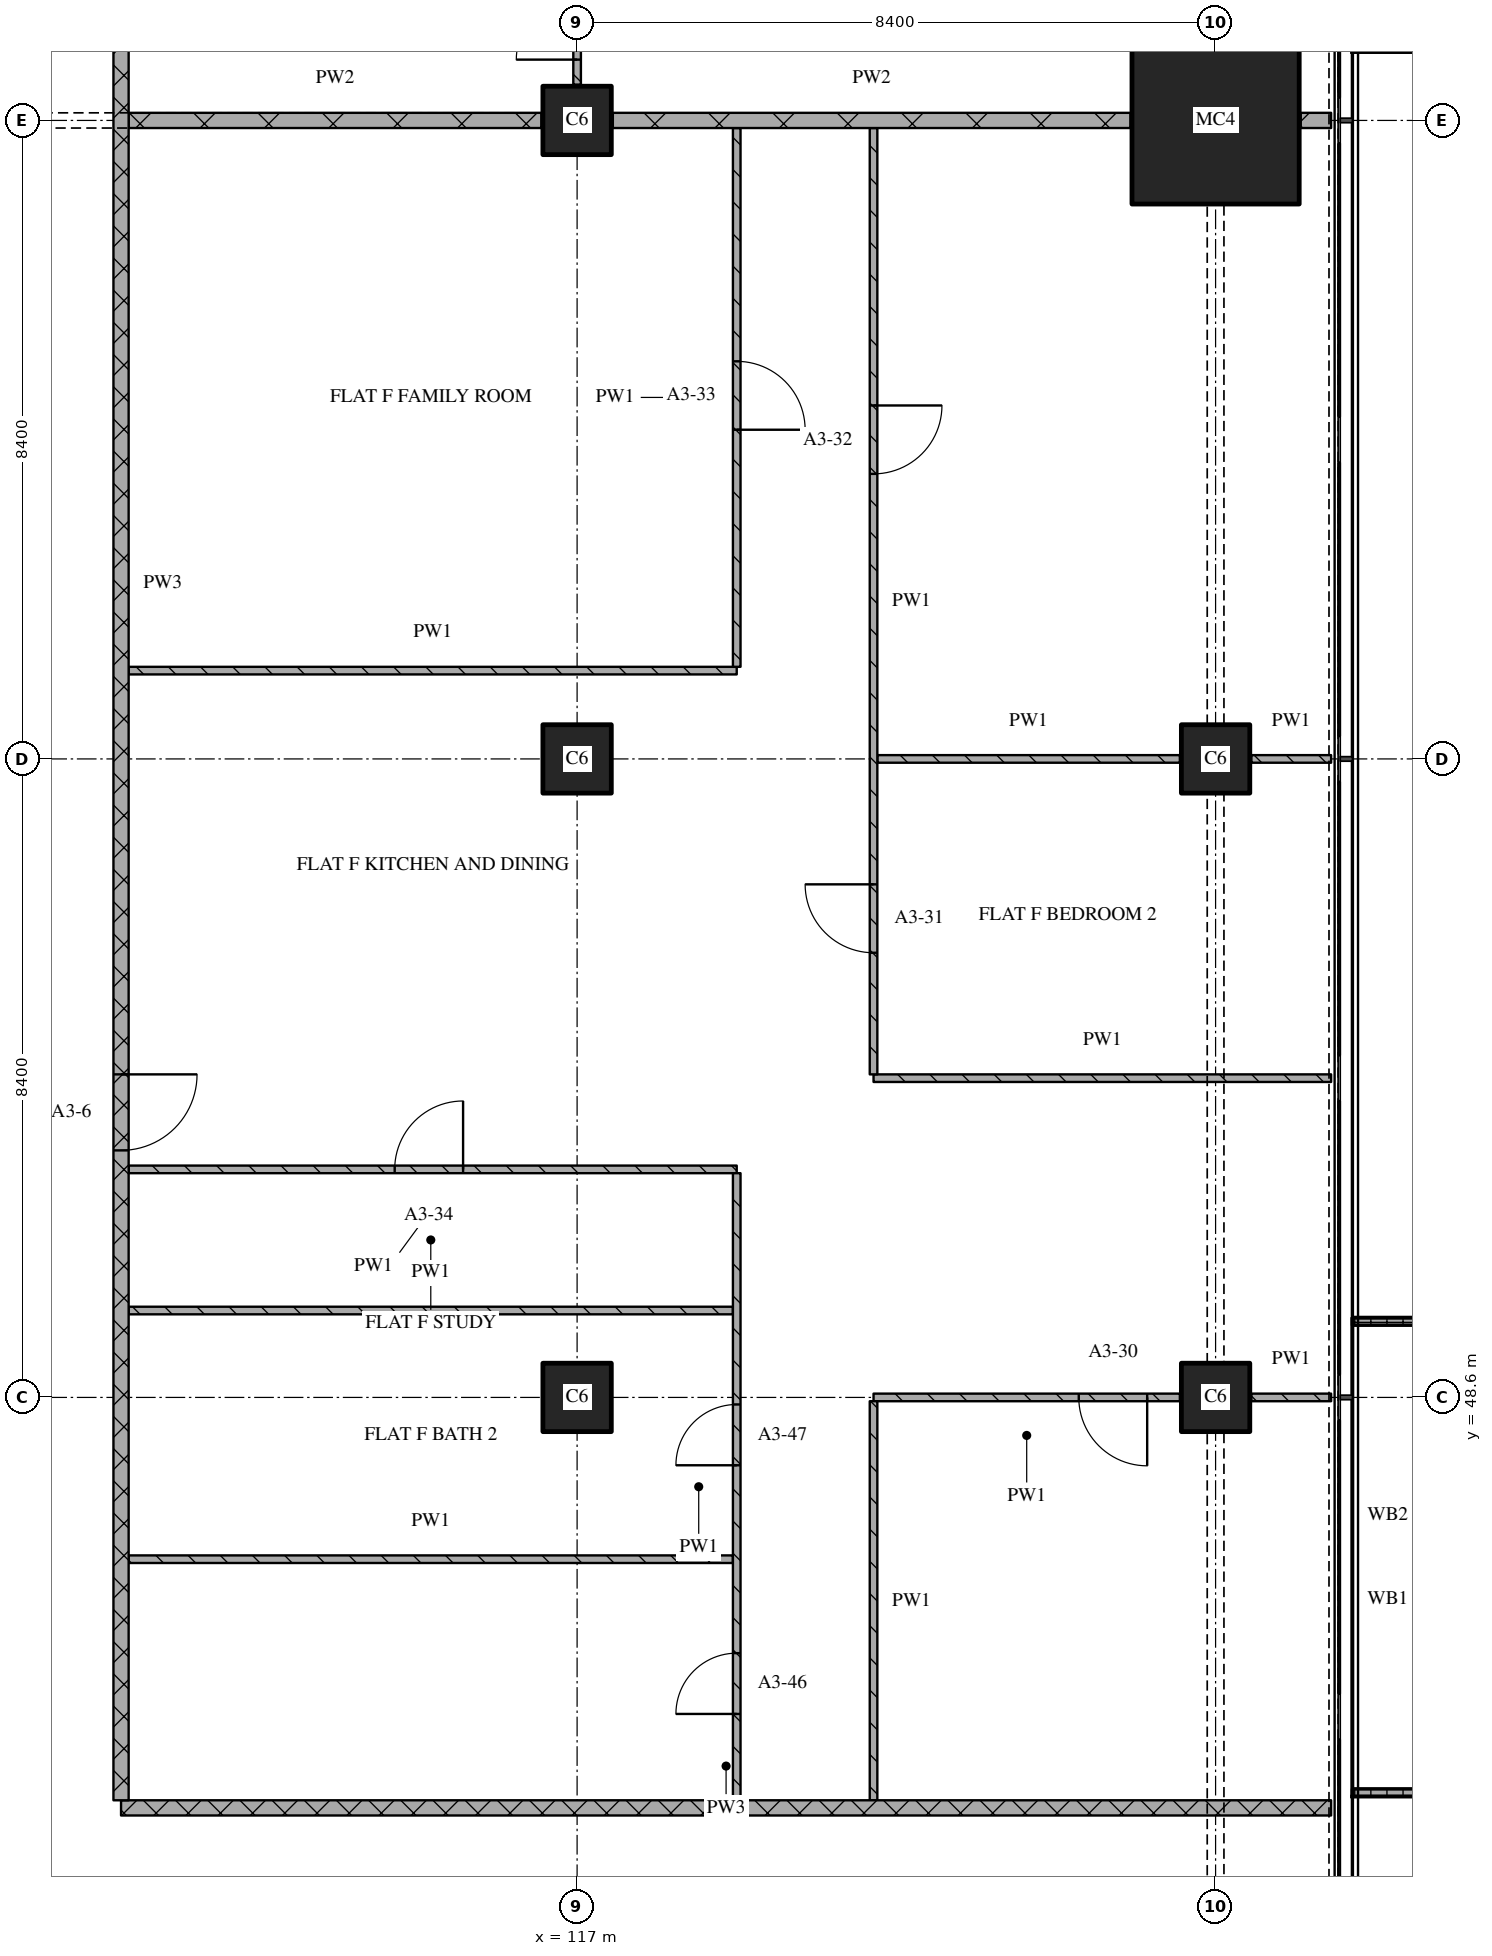
"""IFC4 building model, lengths in metres.
Left out: names, types, materials, properties, quantities, classifications, styles, units other than length and angle.
Written with IfcOpenShell. Run it as: python <this file> out.ifc"""

import sys

from ifc_helpers import new_model, si_unit, direction, frame, frame_2d, origin, origin_2d, place, context, subcontext, project, spatial, polyline, rectangle, outline, extrude, element, fill, save


model = new_model("IFC4")
c1 = context("Model", 3, precision=1e-05, world=origin(), true_north=direction((0.0, 1.0)))
c2 = subcontext(c1, "Body", "Model", "MODEL_VIEW")
j1 = project(units=[si_unit("LENGTHUNIT", "METRE"), si_unit("PLANEANGLEUNIT", "RADIAN")], contexts=[c1])
p1 = place(None, origin())
s1 = spatial("IfcSite", under=j1, at=p1, CompositionType="ELEMENT")
p2 = place(p1, origin())
s2 = spatial("IfcBuilding", under=s1, at=p2, CompositionType="ELEMENT")
p3 = place(p2, frame((0.0, 0.0, 62.4)))
s3 = spatial("IfcBuildingStorey", under=s2, at=p3, CompositionType="ELEMENT", Elevation=62.4)
for number, where, z_axis, x_axis in (
    (1, (117.0, 48.6, 0.0), (0.0, 0.0, 1.0), (1.0, 0.0, 0.0)),
    (2, (117.0, 57.0, 0.0), (0.0, 0.0, 1.0), (1.0, 0.0, 0.0)),
    (3, (117.0, 65.4, 0.0), (0.0, 0.0, 1.0), (1.0, 0.0, 0.0)),
    (4, (125.4, 48.6, 0.0), (0.0, 0.0, 1.0), (1.0, 0.0, 0.0)),
    (5, (125.4, 57.0, 0.0), (0.0, 0.0, 1.0), (1.0, 0.0, 0.0)),
):
    element("IfcColumn", number, at=place(p3, frame(where, z_axis=z_axis, x_axis=x_axis)), inside=s3, PredefinedType="COLUMN", context=c2, shape_type="SweptSolid", body=[
        extrude(rectangle(XDim=0.9, YDim=0.9, at=origin_2d()), origin(), (0.0, 0.0, 1.0), 3.6),
    ])
p4 = place(p3, frame((125.4, 65.4, 0.0), z_axis=(0.0, 0.0, 1.0), x_axis=(1.0, 0.0, 0.0)))
e6 = element("IfcColumn", 6, at=p4, inside=s3, PredefinedType="COLUMN", context=c2, shape_type="SweptSolid", body=[
    extrude(rectangle(XDim=2.2, YDim=2.2, at=origin_2d()), origin(), (0.0, 0.0, 1.0), 3.6),
])
p5 = place(p3, origin())
e7 = element("IfcWall", 7, at=p5, inside=s3, PredefinedType="SOLIDWALL", context=c2, shape_type="SweptSolid", body=[
    extrude(outline(polyline([(127.2, 43.35), (127.2, 43.45), (128.967, 43.45), (128.967, 49.55), (127.2, 49.55), (127.2, 49.65), (129.067, 49.65), (129.067, 43.35), (127.2, 43.35)])), origin(), (0.0, 0.0, 1.0), 1.0),
])
p6 = place(p3, frame((111.0, 43.2, 0.0), z_axis=(0.0, 0.0, 1.0), x_axis=(1.0, 0.0, 0.0)))
e8 = element("IfcWall", 8, at=p6, inside=s3, PredefinedType="PARTITIONING", context=c2, shape_type="SweptSolid", body=[
    extrude(rectangle(XDim=15.92, YDim=0.2, at=frame_2d((7.96, 0.0))), origin(), (0.0, 0.0, 1.0), 3.32),
])
p7 = place(p3, frame((111.1, 46.472, 0.0), z_axis=(0.0, 0.0, 1.0), x_axis=(1.0, 0.0, 0.0)))
e9 = element("IfcWall", 9, at=p7, inside=s3, PredefinedType="PARTITIONING", context=c2, shape_type="SweptSolid", body=[
    extrude(rectangle(XDim=7.95, YDim=0.1, at=frame_2d((3.975, 0.0))), origin(), (0.0, 0.0, 1.0), 3.32),
])
p8 = place(p3, frame((124.93, 48.6, 0.0), z_axis=(0.0, 0.0, 1.0), x_axis=(-1.0, 0.0, 0.0)))
e10 = element("IfcWall", 10, at=p8, inside=s3, PredefinedType="PARTITIONING", context=c2, shape_type="SweptSolid", body=[
    extrude(rectangle(XDim=4.03, YDim=0.1, at=frame_2d((2.015, 0.0))), origin(), (0.0, 0.0, 1.0), 3.32),
])
p9 = place(p8, frame((0.43, 0.0, 0.0)))
e11 = element("IfcOpeningElement", 11, at=p9, cuts=e10, PredefinedType="OPENING", context=c2, shape_type="SweptSolid", body=[
    extrude(rectangle(XDim=0.9, YDim=2.1, at=frame_2d((0.45, 1.05))), frame((0.0, 0.06, 0.0), z_axis=(0.0, -1.0, 0.0), x_axis=(1.0, 0.0, 0.0)), (0.0, 0.0, 1.0), 0.12),
])
p10 = place(p3, frame((125.87, 48.6, 0.0), z_axis=(0.0, 0.0, 1.0), x_axis=(1.0, 0.0, 0.0)))
e12 = element("IfcWall", 12, at=p10, inside=s3, PredefinedType="PARTITIONING", context=c2, shape_type="SweptSolid", body=[
    extrude(rectangle(XDim=1.05, YDim=0.1, at=frame_2d((0.525, 0.0))), origin(), (0.0, 0.0, 1.0), 3.32),
])
p11 = place(p3, frame((111.1, 49.743, 0.0), z_axis=(0.0, 0.0, 1.0), x_axis=(1.0, 0.0, 0.0)))
e13 = element("IfcWall", 13, at=p11, inside=s3, PredefinedType="PARTITIONING", context=c2, shape_type="SweptSolid", body=[
    extrude(rectangle(XDim=7.95, YDim=0.1, at=frame_2d((3.975, 0.0))), origin(), (0.0, 0.0, 1.0), 3.32),
])
p12 = place(p3, frame((119.1, 51.6, 0.0), z_axis=(0.0, 0.0, 1.0), x_axis=(-1.0, 0.0, 0.0)))
e14 = element("IfcWall", 14, at=p12, inside=s3, PredefinedType="PARTITIONING", context=c2, shape_type="SweptSolid", body=[
    extrude(rectangle(XDim=8.0, YDim=0.1, at=frame_2d((4.0, 0.0))), origin(), (0.0, 0.0, 1.0), 3.32),
])
p13 = place(p12, frame((3.6, 0.0, 0.0)))
e15 = element("IfcOpeningElement", 15, at=p13, cuts=e14, PredefinedType="OPENING", context=c2, shape_type="SweptSolid", body=[
    extrude(rectangle(XDim=0.9, YDim=2.1, at=frame_2d((0.45, 1.05))), frame((0.0, 0.06, 0.0), z_axis=(0.0, -1.0, 0.0), x_axis=(1.0, 0.0, 0.0)), (0.0, 0.0, 1.0), 0.12),
])
p14 = place(p3, frame((120.9, 52.8, 0.0), z_axis=(0.0, 0.0, 1.0), x_axis=(1.0, 0.0, 0.0)))
e16 = element("IfcWall", 16, at=p14, inside=s3, PredefinedType="PARTITIONING", context=c2, shape_type="SweptSolid", body=[
    extrude(rectangle(XDim=6.02, YDim=0.1, at=frame_2d((3.01, 0.0))), origin(), (0.0, 0.0, 1.0), 3.32),
])
p15 = place(p3, frame((120.95, 57.0, 0.0), z_axis=(0.0, 0.0, 1.0), x_axis=(1.0, 0.0, 0.0)))
e17 = element("IfcWall", 17, at=p15, inside=s3, PredefinedType="PARTITIONING", context=c2, shape_type="SweptSolid", body=[
    extrude(rectangle(XDim=3.98, YDim=0.1, at=frame_2d((1.99, 0.0))), origin(), (0.0, 0.0, 1.0), 3.32),
])
p16 = place(p3, frame((125.87, 57.0, 0.0), z_axis=(0.0, 0.0, 1.0), x_axis=(1.0, 0.0, 0.0)))
e18 = element("IfcWall", 18, at=p16, inside=s3, PredefinedType="PARTITIONING", context=c2, shape_type="SweptSolid", body=[
    extrude(rectangle(XDim=1.05, YDim=0.1, at=frame_2d((0.525, 0.0))), origin(), (0.0, 0.0, 1.0), 3.32),
])
p17 = place(p3, frame((111.1, 58.162, 0.0), z_axis=(0.0, 0.0, 1.0), x_axis=(1.0, 0.0, 0.0)))
e19 = element("IfcWall", 19, at=p17, inside=s3, PredefinedType="PARTITIONING", context=c2, shape_type="SweptSolid", body=[
    extrude(rectangle(XDim=8.0, YDim=0.1, at=frame_2d((4.0, 0.0))), origin(), (0.0, 0.0, 1.0), 3.32),
])
p18 = place(p3, frame((111.1, 65.4, 0.0), z_axis=(0.0, 0.0, 1.0), x_axis=(1.0, 0.0, 0.0)))
e20 = element("IfcWall", 20, at=p18, inside=s3, PredefinedType="PARTITIONING", context=c2, shape_type="SweptSolid", body=[
    extrude(rectangle(XDim=5.43, YDim=0.2, at=frame_2d((2.715, 0.0))), origin(), (0.0, 0.0, 1.0), 2.82),
])
p19 = place(p3, frame((117.47, 65.4, 0.0), z_axis=(0.0, 0.0, 1.0), x_axis=(1.0, 0.0, 0.0)))
e21 = element("IfcWall", 21, at=p19, inside=s3, PredefinedType="PARTITIONING", context=c2, shape_type="SweptSolid", body=[
    extrude(rectangle(XDim=6.81, YDim=0.2, at=frame_2d((3.405, 0.0))), origin(), (0.0, 0.0, 1.0), 3.32),
])
p20 = place(p3, frame((126.52, 65.4, 0.0), z_axis=(0.0, 0.0, 1.0), x_axis=(1.0, 0.0, 0.0)))
e22 = element("IfcWall", 22, at=p20, inside=s3, PredefinedType="PARTITIONING", context=c2, shape_type="SweptSolid", body=[
    extrude(rectangle(XDim=0.4, YDim=0.2, at=frame_2d((0.2, 0.0))), origin(), (0.0, 0.0, 1.0), 3.32),
])
p21 = place(p3, frame((111.0, 75.32, 0.0), z_axis=(0.0, 0.0, 1.0), x_axis=(0.0, -1.0, 0.0)))
e23 = element("IfcWall", 23, at=p21, inside=s3, PredefinedType="PARTITIONING", context=c2, shape_type="SweptSolid", body=[
    extrude(rectangle(XDim=32.02, YDim=0.2, at=frame_2d((16.01, 0.0))), origin(), (0.0, 0.0, 1.0), 3.32),
])
p22 = place(p21, frame((6.27, 0.0, 0.0)))
e24 = element("IfcOpeningElement", 24, at=p22, cuts=e23, PredefinedType="OPENING", context=c2, shape_type="SweptSolid", body=[
    extrude(rectangle(XDim=1.0, YDim=2.1, at=frame_2d((0.5, 1.05))), frame((0.0, 0.11, 0.0), z_axis=(0.0, -1.0, 0.0), x_axis=(1.0, 0.0, 0.0)), (0.0, 0.0, 1.0), 0.22),
])
p23 = place(p21, frame((22.47, 0.0, 0.0)))
e25 = element("IfcOpeningElement", 25, at=p23, cuts=e23, PredefinedType="OPENING", context=c2, shape_type="SweptSolid", body=[
    extrude(rectangle(XDim=1.0, YDim=2.1, at=frame_2d((0.5, 1.05))), frame((0.0, 0.11, 0.0), z_axis=(0.0, -1.0, 0.0), x_axis=(1.0, 0.0, 0.0)), (0.0, 0.0, 1.0), 0.22),
])
p24 = place(p3, frame((117.0, 65.87, 0.0), z_axis=(0.0, 0.0, 1.0), x_axis=(0.0, 1.0, 0.0)))
e26 = element("IfcWall", 26, at=p24, inside=s3, PredefinedType="PARTITIONING", context=c2, shape_type="SweptSolid", body=[
    extrude(rectangle(XDim=1.88, YDim=0.1, at=frame_2d((0.94, 0.0))), origin(), (0.0, 0.0, 1.0), 3.32),
])
p25 = place(p24, frame((0.33, 0.0, 0.0)))
e27 = element("IfcOpeningElement", 27, at=p25, cuts=e26, PredefinedType="OPENING", context=c2, shape_type="SweptSolid", body=[
    extrude(rectangle(XDim=0.8, YDim=2.1, at=frame_2d((0.4, 1.05))), frame((0.0, 0.06, 0.0), z_axis=(0.0, -1.0, 0.0), x_axis=(1.0, 0.0, 0.0)), (0.0, 0.0, 1.0), 0.12),
])
p26 = place(p3, frame((119.1, 43.3, 0.0), z_axis=(0.0, 0.0, 1.0), x_axis=(0.0, 1.0, 0.0)))
e28 = element("IfcWall", 28, at=p26, inside=s3, PredefinedType="PARTITIONING", context=c2, shape_type="SweptSolid", body=[
    extrude(rectangle(XDim=8.25, YDim=0.1, at=frame_2d((4.125, 0.0))), origin(), (0.0, 0.0, 1.0), 3.32),
])
p27 = place(p26, frame((1.136, 0.0, 0.0)))
e29 = element("IfcOpeningElement", 29, at=p27, cuts=e28, PredefinedType="OPENING", context=c2, shape_type="SweptSolid", body=[
    extrude(rectangle(XDim=0.8, YDim=2.1, at=frame_2d((0.4, 1.05))), frame((0.0, 0.06, 0.0), z_axis=(0.0, -1.0, 0.0), x_axis=(1.0, 0.0, 0.0)), (0.0, 0.0, 1.0), 0.12),
])
p28 = place(p26, frame((4.407, 0.0, 0.0)))
e30 = element("IfcOpeningElement", 30, at=p28, cuts=e28, PredefinedType="OPENING", context=c2, shape_type="SweptSolid", body=[
    extrude(rectangle(XDim=0.8, YDim=2.1, at=frame_2d((0.4, 1.05))), frame((0.0, 0.06, 0.0), z_axis=(0.0, -1.0, 0.0), x_axis=(1.0, 0.0, 0.0)), (0.0, 0.0, 1.0), 0.12),
])
p29 = place(p3, frame((119.1, 58.212, 0.0), z_axis=(0.0, 0.0, 1.0), x_axis=(0.0, 1.0, 0.0)))
e31 = element("IfcWall", 31, at=p29, inside=s3, PredefinedType="PARTITIONING", context=c2, shape_type="SweptSolid", body=[
    extrude(rectangle(XDim=7.088, YDim=0.1, at=frame_2d((3.544, 0.0))), origin(), (0.0, 0.0, 1.0), 3.32),
])
p30 = place(p29, frame((3.119, 0.0, 0.0)))
e32 = element("IfcOpeningElement", 32, at=p30, cuts=e31, PredefinedType="OPENING", context=c2, shape_type="SweptSolid", body=[
    extrude(rectangle(XDim=0.9, YDim=2.1, at=frame_2d((0.45, 1.05))), frame((0.0, 0.06, 0.0), z_axis=(0.0, -1.0, 0.0), x_axis=(1.0, 0.0, 0.0)), (0.0, 0.0, 1.0), 0.12),
])
p31 = place(p3, frame((120.9, 48.55, 0.0), z_axis=(0.0, 0.0, 1.0), x_axis=(0.0, -1.0, 0.0)))
e33 = element("IfcWall", 33, at=p31, inside=s3, PredefinedType="PARTITIONING", context=c2, shape_type="SweptSolid", body=[
    extrude(rectangle(XDim=5.25, YDim=0.1, at=frame_2d((2.625, 0.0))), origin(), (0.0, 0.0, 1.0), 3.32),
])
p32 = place(p3, frame((120.9, 65.3, 0.0), z_axis=(0.0, 0.0, 1.0), x_axis=(0.0, -1.0, 0.0)))
e34 = element("IfcWall", 34, at=p32, inside=s3, PredefinedType="PARTITIONING", context=c2, shape_type="SweptSolid", body=[
    extrude(rectangle(XDim=12.45, YDim=0.1, at=frame_2d((6.225, 0.0))), origin(), (0.0, 0.0, 1.0), 3.32),
])
p33 = place(p32, frame((3.65, 0.0, 0.0)))
e35 = element("IfcOpeningElement", 35, at=p33, cuts=e34, PredefinedType="OPENING", context=c2, shape_type="SweptSolid", body=[
    extrude(rectangle(XDim=0.9, YDim=2.1, at=frame_2d((0.45, 1.05))), frame((0.0, 0.06, 0.0), z_axis=(0.0, -1.0, 0.0), x_axis=(1.0, 0.0, 0.0)), (0.0, 0.0, 1.0), 0.12),
])
p34 = place(p32, frame((9.95, 0.0, 0.0)))
e36 = element("IfcOpeningElement", 36, at=p34, cuts=e34, PredefinedType="OPENING", context=c2, shape_type="SweptSolid", body=[
    extrude(rectangle(XDim=0.9, YDim=2.1, at=frame_2d((0.45, 1.05))), frame((0.0, 0.06, 0.0), z_axis=(0.0, -1.0, 0.0), x_axis=(1.0, 0.0, 0.0)), (0.0, 0.0, 1.0), 0.12),
])
p35 = place(p9, origin())
e37 = element("IfcDoor", 37, at=p35, inside=s3, OperationType="SINGLE_SWING_LEFT", PredefinedType="DOOR", context=c2, shape_type="SweptSolid", body=[
    extrude(rectangle(XDim=0.9, YDim=2.1, at=frame_2d((0.45, 1.05))), frame((0.0, 0.025, 0.0), z_axis=(0.0, -1.0, 0.0), x_axis=(1.0, 0.0, 0.0)), (0.0, 0.0, 1.0), 0.05),
])
fill(e11, e37)
p36 = place(p13, origin())
e38 = element("IfcDoor", 38, at=p36, inside=s3, OperationType="SINGLE_SWING_RIGHT", PredefinedType="DOOR", context=c2, shape_type="SweptSolid", body=[
    extrude(rectangle(XDim=0.9, YDim=2.1, at=frame_2d((0.45, 1.05))), frame((0.0, 0.025, 0.0), z_axis=(0.0, -1.0, 0.0), x_axis=(1.0, 0.0, 0.0)), (0.0, 0.0, 1.0), 0.05),
])
fill(e15, e38)
p37 = place(p23, origin())
e39 = element("IfcDoor", 39, at=p37, inside=s3, OperationType="SINGLE_SWING_LEFT", PredefinedType="DOOR", context=c2, shape_type="SweptSolid", body=[
    extrude(rectangle(XDim=1.0, YDim=2.1, at=frame_2d((0.5, 1.05))), frame((0.0, 0.025, 0.0), z_axis=(0.0, -1.0, 0.0), x_axis=(1.0, 0.0, 0.0)), (0.0, 0.0, 1.0), 0.05),
])
fill(e25, e39)
p38 = place(p25, origin())
e40 = element("IfcDoor", 40, at=p38, inside=s3, OperationType="SINGLE_SWING_LEFT", PredefinedType="DOOR", context=c2, shape_type="SweptSolid", body=[
    extrude(rectangle(XDim=0.8, YDim=2.1, at=frame_2d((0.4, 1.05))), frame((0.0, 0.025, 0.0), z_axis=(0.0, -1.0, 0.0), x_axis=(1.0, 0.0, 0.0)), (0.0, 0.0, 1.0), 0.05),
])
fill(e27, e40)
p39 = place(p27, origin())
e41 = element("IfcDoor", 41, at=p39, inside=s3, OperationType="SINGLE_SWING_LEFT", PredefinedType="DOOR", context=c2, shape_type="SweptSolid", body=[
    extrude(rectangle(XDim=0.8, YDim=2.1, at=frame_2d((0.4, 1.05))), frame((0.0, 0.025, 0.0), z_axis=(0.0, -1.0, 0.0), x_axis=(1.0, 0.0, 0.0)), (0.0, 0.0, 1.0), 0.05),
])
fill(e29, e41)
p40 = place(p28, origin())
e42 = element("IfcDoor", 42, at=p40, inside=s3, OperationType="SINGLE_SWING_LEFT", PredefinedType="DOOR", context=c2, shape_type="SweptSolid", body=[
    extrude(rectangle(XDim=0.8, YDim=2.1, at=frame_2d((0.4, 1.05))), frame((0.0, 0.025, 0.0), z_axis=(0.0, -1.0, 0.0), x_axis=(1.0, 0.0, 0.0)), (0.0, 0.0, 1.0), 0.05),
])
fill(e30, e42)
p41 = place(p30, origin())
e43 = element("IfcDoor", 43, at=p41, inside=s3, OperationType="SINGLE_SWING_RIGHT", PredefinedType="DOOR", context=c2, shape_type="SweptSolid", body=[
    extrude(rectangle(XDim=0.9, YDim=2.1, at=frame_2d((0.45, 1.05))), frame((0.0, 0.025, 0.0), z_axis=(0.0, -1.0, 0.0), x_axis=(1.0, 0.0, 0.0)), (0.0, 0.0, 1.0), 0.05),
])
fill(e32, e43)
p42 = place(p33, origin())
e44 = element("IfcDoor", 44, at=p42, inside=s3, OperationType="SINGLE_SWING_LEFT", PredefinedType="DOOR", context=c2, shape_type="SweptSolid", body=[
    extrude(rectangle(XDim=0.9, YDim=2.1, at=frame_2d((0.45, 1.05))), frame((0.0, 0.025, 0.0), z_axis=(0.0, -1.0, 0.0), x_axis=(1.0, 0.0, 0.0)), (0.0, 0.0, 1.0), 0.05),
])
fill(e35, e44)
p43 = place(p34, origin())
e45 = element("IfcDoor", 45, at=p43, inside=s3, OperationType="SINGLE_SWING_RIGHT", PredefinedType="DOOR", context=c2, shape_type="SweptSolid", body=[
    extrude(rectangle(XDim=0.9, YDim=2.1, at=frame_2d((0.45, 1.05))), frame((0.0, 0.025, 0.0), z_axis=(0.0, -1.0, 0.0), x_axis=(1.0, 0.0, 0.0)), (0.0, 0.0, 1.0), 0.05),
])
fill(e36, e45)
save(model, sys.argv[1])
